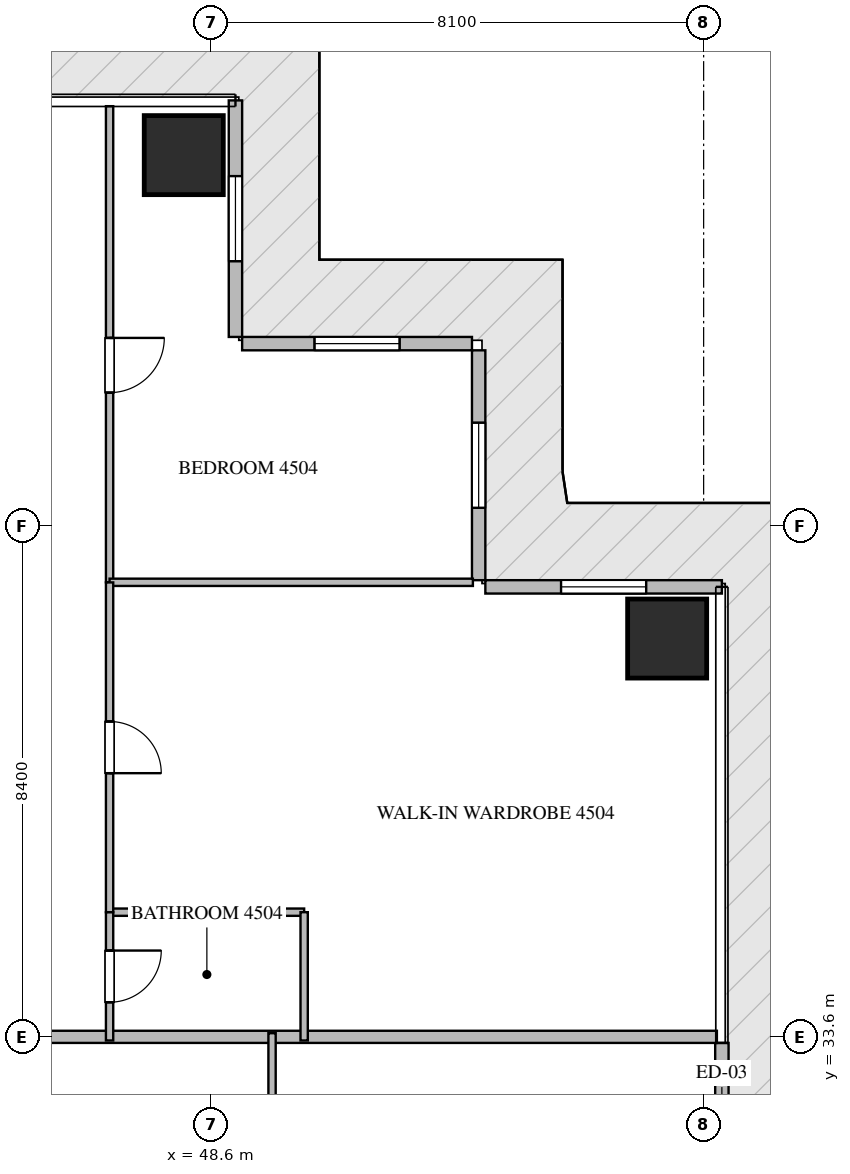
"""IFC4 building model, lengths in metres.
Left out: names, types, materials, properties, quantities, classifications, styles, units other than length and angle.
Written with IfcOpenShell. Run it as: python <this file> out.ifc"""

import sys

from ifc_helpers import new_model, si_unit, direction, frame, frame_2d, origin, origin_2d, place, context, subcontext, project, spatial, rectangle, extrude, source, transform, mapped, element, fill, save


model = new_model("IFC4")
c1 = context("Model", 3, precision=1e-05, world=origin(), true_north=direction((0.0, 1.0)))
c2 = subcontext(c1, "Body", "Model", "MODEL_VIEW")
j1 = project(units=[si_unit("LENGTHUNIT", "METRE"), si_unit("PLANEANGLEUNIT", "RADIAN")], contexts=[c1])
p1 = place(None, origin())
s1 = spatial("IfcSite", under=j1, at=p1, CompositionType="ELEMENT")
p2 = place(p1, origin())
s2 = spatial("IfcBuilding", under=s1, at=p2, CompositionType="ELEMENT")
p3 = place(p2, frame((0.0, 0.0, 180.15)))
s3 = spatial("IfcBuildingStorey", under=s2, at=p3, CompositionType="ELEMENT", Elevation=180.15)
m1 = source(origin(), c2, "Body", "SweptSolid", [
    extrude(rectangle(XDim=1.3, YDim=1.3, at=origin_2d()), origin(), (0.0, 0.0, 1.0), 3.75),
])
for number, where, z_axis, x_axis in (
    (1, (48.15, 48.1, -0.26), (0.0, 0.0, 1.0), (1.0, 0.0, 0.0)),
    (2, (56.1, 40.15, -0.26), (0.0, 0.0, 1.0), (1.0, 0.0, 0.0)),
):
    element("IfcColumn", number, at=place(p3, frame(where, z_axis=z_axis, x_axis=x_axis)), inside=s3, PredefinedType="COLUMN", context=c2, shape_type="MappedRepresentation", body=[
        mapped(m1, transform((0.0, 0.0, 0.0), scale=1.0)),
    ])
p4 = place(p3, frame((57.0, 30.5, 0.0), z_axis=(0.0, 0.0, 1.0), x_axis=(0.0, 1.0, 0.0)))
e3 = element("IfcWall", 3, at=p4, inside=s3, PredefinedType="ELEMENTEDWALL", context=c2, shape_type="SweptSolid", body=[
    extrude(rectangle(XDim=3.0, YDim=0.22, at=frame_2d((1.5, 0.0))), origin(), (0.0, 0.0, 1.0), 3.475),
])
p5 = place(p4, frame((0.95, 0.0, 0.0)))
e4 = element("IfcOpeningElement", 4, at=p5, cuts=e3, PredefinedType="OPENING", context=c2, shape_type="SweptSolid", body=[
    extrude(rectangle(XDim=1.1, YDim=2.2, at=frame_2d((0.55, 1.1))), frame((0.0, 0.12, 0.0), z_axis=(0.0, -1.0, 0.0), x_axis=(1.0, 0.0, 0.0)), (0.0, 0.0, 1.0), 0.24),
])
p6 = place(p3, frame((57.0, 41.0, 0.0), z_axis=(0.0, 0.0, 1.0), x_axis=(-1.0, 0.0, 0.0)))
e5 = element("IfcWall", 5, at=p6, inside=s3, PredefinedType="ELEMENTEDWALL", context=c2, shape_type="SweptSolid", body=[
    extrude(rectangle(XDim=3.89, YDim=0.22, at=frame_2d((1.945, 0.0))), origin(), (0.0, 0.0, 1.0), 3.475),
])
p7 = place(p6, frame((1.245, 0.0, 0.65)))
e6 = element("IfcOpeningElement", 6, at=p7, cuts=e5, PredefinedType="OPENING", context=c2, shape_type="SweptSolid", body=[
    extrude(rectangle(XDim=1.4, YDim=2.05, at=frame_2d((0.7, 1.025))), frame((0.0, 0.12, 0.0), z_axis=(0.0, -1.0, 0.0), x_axis=(1.0, 0.0, 0.0)), (0.0, 0.0, 1.0), 0.24),
])
p8 = place(p3, frame((53.0, 41.11, 0.0), z_axis=(0.0, 0.0, 1.0), x_axis=(0.0, 1.0, 0.0)))
e7 = element("IfcWall", 7, at=p8, inside=s3, PredefinedType="ELEMENTEDWALL", context=c2, shape_type="SweptSolid", body=[
    extrude(rectangle(XDim=3.78, YDim=0.22, at=frame_2d((1.89, 0.0))), origin(), (0.0, 0.0, 1.0), 3.475),
])
p9 = place(p8, frame((1.19, 0.0, 0.65)))
e8 = element("IfcOpeningElement", 8, at=p9, cuts=e7, PredefinedType="OPENING", context=c2, shape_type="SweptSolid", body=[
    extrude(rectangle(XDim=1.4, YDim=2.05, at=frame_2d((0.7, 1.025))), frame((0.0, 0.12, 0.0), z_axis=(0.0, -1.0, 0.0), x_axis=(1.0, 0.0, 0.0)), (0.0, 0.0, 1.0), 0.24),
])
p10 = place(p3, frame((52.89, 45.0, 0.0), z_axis=(0.0, 0.0, 1.0), x_axis=(-1.0, 0.0, 0.0)))
e9 = element("IfcWall", 9, at=p10, inside=s3, PredefinedType="ELEMENTEDWALL", context=c2, shape_type="SweptSolid", body=[
    extrude(rectangle(XDim=3.78, YDim=0.22, at=frame_2d((1.89, 0.0))), origin(), (0.0, 0.0, 1.0), 3.475),
])
p11 = place(p10, frame((1.19, 0.0, 0.65)))
e10 = element("IfcOpeningElement", 10, at=p11, cuts=e9, PredefinedType="OPENING", context=c2, shape_type="SweptSolid", body=[
    extrude(rectangle(XDim=1.4, YDim=2.05, at=frame_2d((0.7, 1.025))), frame((0.0, 0.12, 0.0), z_axis=(0.0, -1.0, 0.0), x_axis=(1.0, 0.0, 0.0)), (0.0, 0.0, 1.0), 0.24),
])
p12 = place(p3, frame((49.0, 45.11, 0.0), z_axis=(0.0, 0.0, 1.0), x_axis=(0.0, 1.0, 0.0)))
e11 = element("IfcWall", 11, at=p12, inside=s3, PredefinedType="ELEMENTEDWALL", context=c2, shape_type="SweptSolid", body=[
    extrude(rectangle(XDim=3.89, YDim=0.22, at=frame_2d((1.945, 0.0))), origin(), (0.0, 0.0, 1.0), 3.475),
])
p13 = place(p12, frame((1.245, 0.0, 0.65)))
e12 = element("IfcOpeningElement", 12, at=p13, cuts=e11, PredefinedType="OPENING", context=c2, shape_type="SweptSolid", body=[
    extrude(rectangle(XDim=1.4, YDim=2.05, at=frame_2d((0.7, 1.025))), frame((0.0, 0.12, 0.0), z_axis=(0.0, -1.0, 0.0), x_axis=(1.0, 0.0, 0.0)), (0.0, 0.0, 1.0), 0.24),
])
p14 = place(p3, frame((43.85, 33.6, 0.0), z_axis=(0.0, 0.0, 1.0), x_axis=(1.0, 0.0, 0.0)))
e13 = element("IfcWall", 13, at=p14, inside=s3, PredefinedType="PARTITIONING", context=c2, shape_type="SweptSolid", body=[
    extrude(rectangle(XDim=13.068, YDim=0.2, at=frame_2d((6.534, 0.0))), origin(), (0.0, 0.0, 1.0), 3.49),
])
p15 = place(p3, frame((46.93, 48.905, 0.0), z_axis=(0.0, 0.0, 1.0), x_axis=(0.0, -1.0, 0.0)))
e14 = element("IfcWall", 14, at=p15, inside=s3, PredefinedType="PARTITIONING", context=c2, shape_type="SweptSolid", body=[
    extrude(rectangle(XDim=7.83, YDim=0.12, at=frame_2d((3.915, 0.0))), origin(), (0.0, 0.0, 1.0), 3.49),
])
p16 = place(p15, frame((3.811, 0.0, 0.0)))
e15 = element("IfcOpeningElement", 15, at=p16, cuts=e14, PredefinedType="OPENING", context=c2, shape_type="SweptSolid", body=[
    extrude(rectangle(XDim=0.9, YDim=2.1, at=frame_2d((0.45, 1.05))), frame((0.0, 0.07, 0.0), z_axis=(0.0, -1.0, 0.0), x_axis=(1.0, 0.0, 0.0)), (0.0, 0.0, 1.0), 0.14),
])
p17 = place(p3, frame((46.93, 41.075, 0.0), z_axis=(0.0, 0.0, 1.0), x_axis=(1.0, 0.0, 0.0)))
e16 = element("IfcWall", 16, at=p17, inside=s3, PredefinedType="PARTITIONING", context=c2, shape_type="SweptSolid", body=[
    extrude(rectangle(XDim=5.975, YDim=0.12, at=frame_2d((2.988, 0.0))), origin(), (0.0, 0.0, 1.0), 3.49),
])
p18 = place(p3, frame((46.93, 35.65, 0.0), z_axis=(0.0, 0.0, 1.0), x_axis=(1.0, 0.0, 0.0)))
e17 = element("IfcWall", 17, at=p18, inside=s3, PredefinedType="PARTITIONING", context=c2, shape_type="SweptSolid", body=[
    extrude(rectangle(XDim=3.2, YDim=0.12, at=frame_2d((1.6, 0.0))), origin(), (0.0, 0.0, 1.0), 3.49),
])
p19 = place(p3, frame((50.13, 35.65, 0.0), z_axis=(0.0, 0.0, 1.0), x_axis=(0.0, -1.0, 0.0)))
e18 = element("IfcWall", 18, at=p19, inside=s3, PredefinedType="PARTITIONING", context=c2, shape_type="SweptSolid", body=[
    extrude(rectangle(XDim=2.11, YDim=0.12, at=frame_2d((1.055, 0.0))), origin(), (0.0, 0.0, 1.0), 3.49),
])
p20 = place(p3, frame((46.93, 41.073, 0.0), z_axis=(0.0, 0.0, 1.0), x_axis=(0.0, -1.0, 0.0)))
e19 = element("IfcWall", 19, at=p20, inside=s3, PredefinedType="PARTITIONING", context=c2, shape_type="SweptSolid", body=[
    extrude(rectangle(XDim=5.423, YDim=0.12, at=frame_2d((2.711, 0.0))), origin(), (0.0, 0.0, 1.0), 3.49),
])
p21 = place(p20, frame((2.287, 0.0, 0.0)))
e20 = element("IfcOpeningElement", 20, at=p21, cuts=e19, PredefinedType="OPENING", context=c2, shape_type="SweptSolid", body=[
    extrude(rectangle(XDim=0.85, YDim=2.1, at=frame_2d((0.425, 1.05))), frame((0.0, 0.07, 0.0), z_axis=(0.0, -1.0, 0.0), x_axis=(1.0, 0.0, 0.0)), (0.0, 0.0, 1.0), 0.14),
])
p22 = place(p3, frame((46.93, 35.648, 0.0), z_axis=(0.0, 0.0, 1.0), x_axis=(0.0, -1.0, 0.0)))
e21 = element("IfcWall", 21, at=p22, inside=s3, PredefinedType="PARTITIONING", context=c2, shape_type="SweptSolid", body=[
    extrude(rectangle(XDim=2.108, YDim=0.12, at=frame_2d((1.054, 0.0))), origin(), (0.0, 0.0, 1.0), 3.49),
])
p23 = place(p22, frame((0.629, 0.0, 0.0)))
e22 = element("IfcOpeningElement", 22, at=p23, cuts=e21, PredefinedType="OPENING", context=c2, shape_type="SweptSolid", body=[
    extrude(rectangle(XDim=0.85, YDim=2.1, at=frame_2d((0.425, 1.05))), frame((0.0, 0.07, 0.0), z_axis=(0.0, -1.0, 0.0), x_axis=(1.0, 0.0, 0.0)), (0.0, 0.0, 1.0), 0.14),
])
p24 = place(p3, frame((49.602, 27.8, 0.0), z_axis=(0.0, 0.0, 1.0), x_axis=(0.0, 1.0, 0.0)))
e23 = element("IfcWall", 23, at=p24, inside=s3, PredefinedType="PARTITIONING", context=c2, shape_type="SweptSolid", body=[
    extrude(rectangle(XDim=5.86, YDim=0.12, at=frame_2d((2.93, 0.0))), origin(), (0.0, 0.0, 1.0), 3.49),
])
m2 = source(origin(), c2, "Body", "SweptSolid", [
    extrude(rectangle(XDim=1.4, YDim=2.05, at=frame_2d((0.7, 1.025))), frame((0.0, 0.03, 0.0), z_axis=(0.0, -1.0, 0.0), x_axis=(1.0, 0.0, 0.0)), (0.0, 0.0, 1.0), 0.06),
])
p25 = place(p7, origin())
e24 = element("IfcWindow", 24, at=p25, inside=s3, PartitioningType="SINGLE_PANEL", PredefinedType="WINDOW", context=c2, shape_type="MappedRepresentation", body=[
    mapped(m2, transform((0.0, 0.0, 0.0), scale=1.0)),
])
fill(e6, e24)
p26 = place(p9, origin())
e25 = element("IfcWindow", 25, at=p26, inside=s3, PartitioningType="SINGLE_PANEL", PredefinedType="WINDOW", context=c2, shape_type="MappedRepresentation", body=[
    mapped(m2, transform((0.0, 0.0, 0.0), scale=1.0)),
])
fill(e8, e25)
p27 = place(p11, origin())
e26 = element("IfcWindow", 26, at=p27, inside=s3, PartitioningType="SINGLE_PANEL", PredefinedType="WINDOW", context=c2, shape_type="MappedRepresentation", body=[
    mapped(m2, transform((0.0, 0.0, 0.0), scale=1.0)),
])
fill(e10, e26)
p28 = place(p13, origin())
e27 = element("IfcWindow", 27, at=p28, inside=s3, PartitioningType="SINGLE_PANEL", PredefinedType="WINDOW", context=c2, shape_type="MappedRepresentation", body=[
    mapped(m2, transform((0.0, 0.0, 0.0), scale=1.0)),
])
fill(e12, e27)
m3 = source(origin(), c2, "Body", "SweptSolid", [
    extrude(rectangle(XDim=0.9, YDim=2.1, at=frame_2d((0.45, 1.05))), frame((0.0, 0.025, 0.0), z_axis=(0.0, -1.0, 0.0), x_axis=(1.0, 0.0, 0.0)), (0.0, 0.0, 1.0), 0.05),
])
p29 = place(p16, origin())
e28 = element("IfcDoor", 28, at=p29, inside=s3, OperationType="SINGLE_SWING_LEFT", PredefinedType="DOOR", context=c2, shape_type="MappedRepresentation", body=[
    mapped(m3, transform((0.0, 0.0, 0.0), scale=1.0)),
])
fill(e15, e28)
m4 = source(origin(), c2, "Body", "SweptSolid", [
    extrude(rectangle(XDim=0.85, YDim=2.1, at=frame_2d((0.425, 1.05))), frame((0.0, 0.025, 0.0), z_axis=(0.0, -1.0, 0.0), x_axis=(1.0, 0.0, 0.0)), (0.0, 0.0, 1.0), 0.05),
])
p30 = place(p21, origin())
e29 = element("IfcDoor", 29, at=p30, inside=s3, OperationType="SINGLE_SWING_RIGHT", PredefinedType="DOOR", context=c2, shape_type="MappedRepresentation", body=[
    mapped(m4, transform((0.0, 0.0, 0.0), scale=1.0)),
])
fill(e20, e29)
p31 = place(p23, origin())
e30 = element("IfcDoor", 30, at=p31, inside=s3, OperationType="SINGLE_SWING_LEFT", PredefinedType="DOOR", context=c2, shape_type="MappedRepresentation", body=[
    mapped(m4, transform((0.0, 0.0, 0.0), scale=1.0)),
])
fill(e22, e30)
save(model, sys.argv[1])
